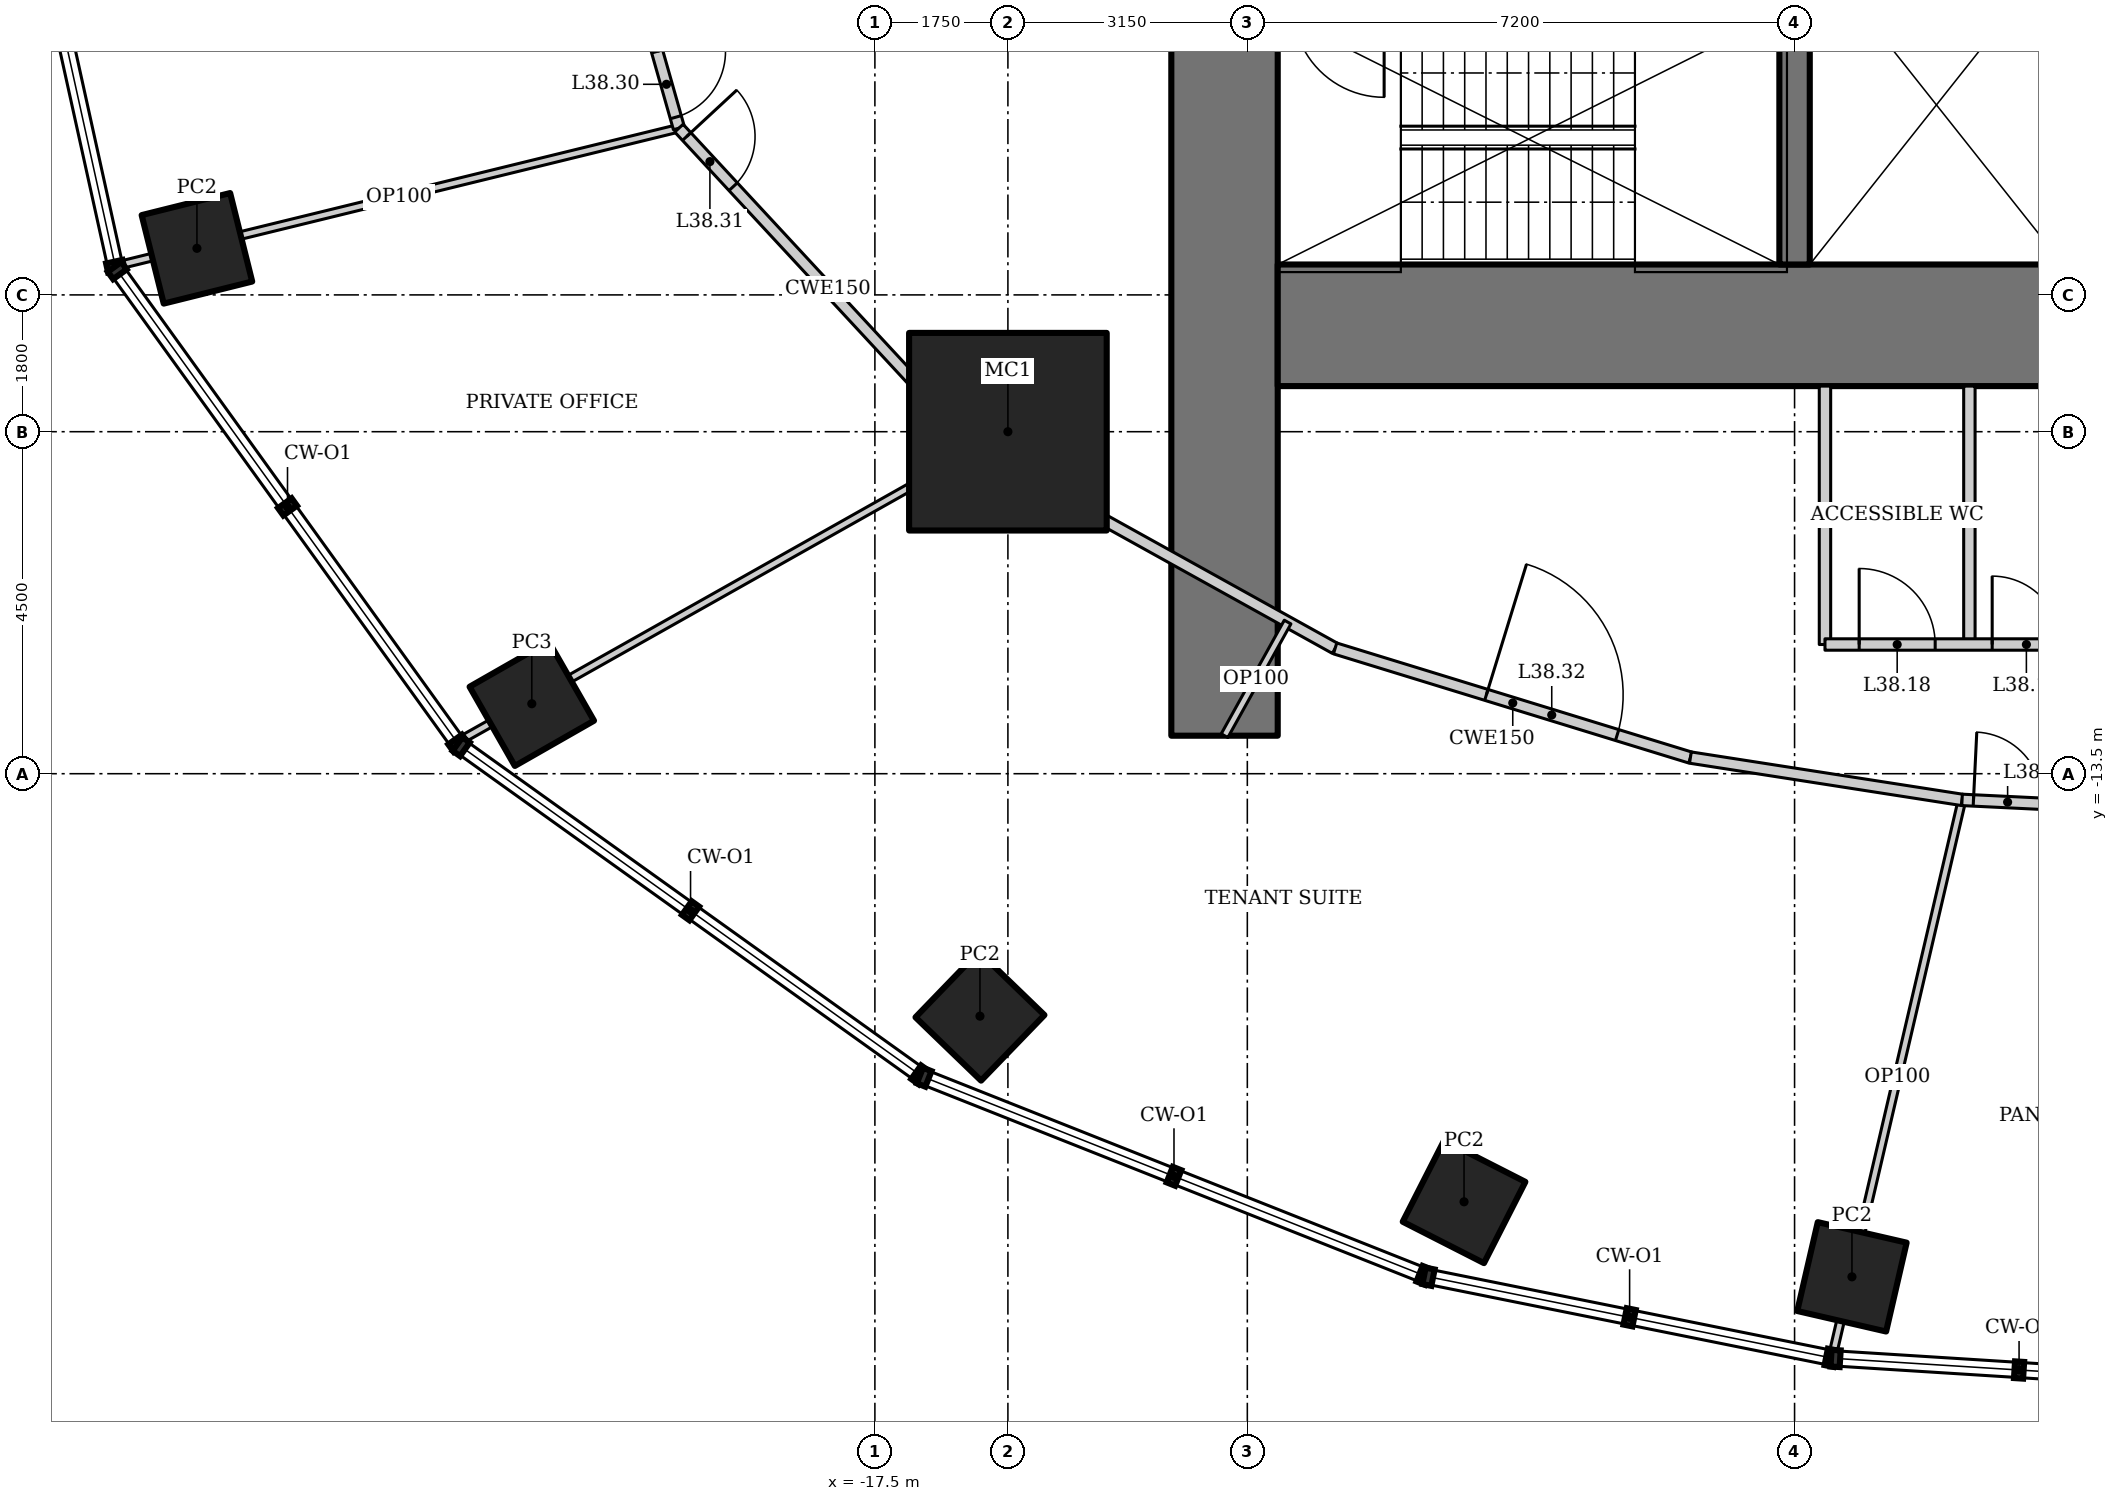
"""IFC4 building model, lengths in metres.
Left out: names, types, materials, properties, quantities, classifications, styles, units other than length and angle.
Written with IfcOpenShell. Run it as: python <this file> out.ifc"""

import sys

from ifc_helpers import new_model, si_unit, direction, frame, frame_2d, origin, origin_2d, place, context, subcontext, project, spatial, rectangle, hollow_rectangle, extrude, element, fill, save


model = new_model("IFC4")
c1 = context("Model", 3, precision=1e-05, world=origin(), true_north=direction((0.0, 1.0)))
c2 = subcontext(c1, "Body", "Model", "MODEL_VIEW")
j1 = project(units=[si_unit("LENGTHUNIT", "METRE"), si_unit("PLANEANGLEUNIT", "RADIAN")], contexts=[c1])
p1 = place(None, origin())
s1 = spatial("IfcSite", under=j1, at=p1, CompositionType="ELEMENT")
p2 = place(p1, origin())
s2 = spatial("IfcBuilding", under=s1, at=p2, CompositionType="ELEMENT")
p3 = place(p2, frame((0.0, 0.0, 163.6)))
s3 = spatial("IfcBuildingStorey", under=s2, at=p3, CompositionType="ELEMENT", Elevation=163.6)
p4 = place(p3, frame((-15.75, -9.0, 0.0), z_axis=(0.0, 0.0, 1.0), x_axis=(1.0, 0.0, 0.0)))
e1 = element("IfcColumn", 1, at=p4, inside=s3, PredefinedType="COLUMN", context=c2, shape_type="SweptSolid", body=[
    extrude(hollow_rectangle(XDim=2.6, YDim=2.6, WallThickness=0.13, at=origin_2d()), origin(), (0.0, 0.0, 1.0), 4.2),
])
p5 = place(p3, frame((-26.42, -6.587, 0.0), z_axis=(0.0, 0.0, 1.0), x_axis=(0.970295726276, 0.2419218956, 0.0)))
e2 = element("IfcColumn", 2, at=p5, inside=s3, PredefinedType="COLUMN", context=c2, shape_type="SweptSolid", body=[
    extrude(hollow_rectangle(XDim=1.2, YDim=1.2, WallThickness=0.1, at=origin_2d()), origin(), (0.0, 0.0, 1.0), 4.2),
])
p6 = place(p3, frame((-22.014, -12.579, 0.0), z_axis=(0.0, 0.0, 1.0), x_axis=(0.86824298017, 0.496139221777, 0.0)))
e3 = element("IfcColumn", 3, at=p6, inside=s3, PredefinedType="COLUMN", context=c2, shape_type="SweptSolid", body=[
    extrude(hollow_rectangle(XDim=1.2, YDim=1.2, WallThickness=0.12, at=origin_2d()), origin(), (0.0, 0.0, 1.0), 4.2),
])
for number, where, z_axis, x_axis in (
    (4, (-16.118, -16.69, 0.0), (0.0, 0.0, 1.0), (0.695, 0.719, 0.0)),
    (5, (-9.749, -19.133, 0.0), (0.0, 0.0, 1.0), (0.454, 0.891, 0.0)),
    (6, (-4.645, -20.12, 0.0), (0.0, 0.0, 1.0), (0.225, 0.974, 0.0)),
):
    element("IfcColumn", number, at=place(p3, frame(where, z_axis=z_axis, x_axis=x_axis)), inside=s3, PredefinedType="COLUMN", context=c2, shape_type="SweptSolid", body=[
        extrude(hollow_rectangle(XDim=1.2, YDim=1.2, WallThickness=0.1, at=origin_2d()), origin(), (0.0, 0.0, 1.0), 4.2),
    ])
p7 = place(p3, frame((-12.9, 13.0, 0.0), z_axis=(0.0, 0.0, 1.0), x_axis=(0.0, -1.0, 0.0)))
e7 = element("IfcWall", 7, at=p7, inside=s3, PredefinedType="SHEAR", context=c2, shape_type="SweptSolid", body=[
    extrude(rectangle(XDim=26.0, YDim=1.4, at=frame_2d((13.0, 0.0))), origin(), (0.0, 0.0, 1.0), 4.2),
])
p8 = place(p7, frame((12.1, 0.0, 0.0)))
e8 = element("IfcOpeningElement", 8, at=p8, cuts=e7, PredefinedType="OPENING", context=c2, shape_type="SweptSolid", body=[
    extrude(rectangle(XDim=1.8, YDim=2.1, at=frame_2d((0.9, 1.05))), frame((0.0, 0.71, 0.0), z_axis=(0.0, -1.0, 0.0), x_axis=(1.0, 0.0, 0.0)), (0.0, 0.0, 1.0), 1.42),
])
p9 = place(p3, frame((-12.2, -7.6, 0.0), z_axis=(0.0, 0.0, 1.0), x_axis=(1.0, 0.0, 0.0)))
e9 = element("IfcWall", 9, at=p9, inside=s3, PredefinedType="SHEAR", context=c2, shape_type="SweptSolid", body=[
    extrude(rectangle(XDim=24.4, YDim=1.6, at=frame_2d((12.2, 0.0))), origin(), (0.0, 0.0, 1.0), 4.2),
])
p10 = place(p3, frame((-5.4, 6.8, 0.0), z_axis=(0.0, 0.0, 1.0), x_axis=(0.0, -1.0, 0.0)))
e10 = element("IfcWall", 10, at=p10, inside=s3, PredefinedType="SHEAR", context=c2, shape_type="SweptSolid", body=[
    extrude(rectangle(XDim=13.6, YDim=0.4, at=frame_2d((6.8, 0.0))), origin(), (0.0, 0.0, 1.0), 4.2),
])
p11 = place(p10, frame((5.9, 0.0, 0.0)))
e11 = element("IfcOpeningElement", 11, at=p11, cuts=e10, PredefinedType="OPENING", context=c2, shape_type="SweptSolid", body=[
    extrude(rectangle(XDim=1.8, YDim=2.1, at=frame_2d((0.9, 1.05))), frame((0.0, 0.21, 0.0), z_axis=(0.0, -1.0, 0.0), x_axis=(1.0, 0.0, 0.0)), (0.0, 0.0, 1.0), 0.42),
])
p12 = place(p3, frame((-27.441, -6.809, 0.0), z_axis=(0.0, 0.0, 1.0), x_axis=(0.971305815804, 0.237834001323, 0.0)))
e12 = element("IfcWall", 12, at=p12, inside=s3, PredefinedType="PARTITIONING", context=c2, shape_type="SweptSolid", body=[
    extrude(rectangle(XDim=7.58, YDim=0.1, at=frame_2d((3.79, 0.0))), origin(), (0.0, 0.0, 1.0), 3.113),
])
p13 = place(p3, frame((-22.949, -13.059, 0.0), z_axis=(0.0, 0.0, 1.0), x_axis=(0.871274989434, 0.490795163777, 0.0)))
e13 = element("IfcWall", 13, at=p13, inside=s3, PredefinedType="PARTITIONING", context=c2, shape_type="SweptSolid", body=[
    extrude(rectangle(XDim=7.792, YDim=0.1, at=frame_2d((3.896, 0.0))), origin(), (0.0, 0.0, 1.0), 3.45),
])
p14 = place(p3, frame((-4.897, -21.135, 0.0), z_axis=(0.0, 0.0, 1.0), x_axis=(0.227181159974, 0.973852514785, 0.0)))
e14 = element("IfcWall", 14, at=p14, inside=s3, PredefinedType="PARTITIONING", context=c2, shape_type="SweptSolid", body=[
    extrude(rectangle(XDim=7.486, YDim=0.1, at=frame_2d((3.743, 0.0))), origin(), (0.0, 0.0, 1.0), 3.293),
])
p15 = place(p3, frame((-21.5, 0.0, 0.0), z_axis=(0.0, 0.0, 1.0), x_axis=(0.273177936169, -0.961963520717, 0.0)))
e15 = element("IfcWall", 15, at=p15, inside=s3, PredefinedType="PARTITIONING", context=c2, shape_type="SweptSolid", body=[
    extrude(rectangle(XDim=5.204, YDim=0.15, at=frame_2d((2.602, 0.0))), origin(), (0.0, 0.0, 1.0), 4.05),
])
p16 = place(p15, frame((4.154, 0.0, 0.0)))
e16 = element("IfcOpeningElement", 16, at=p16, cuts=e15, PredefinedType="OPENING", context=c2, shape_type="SweptSolid", body=[
    extrude(rectangle(XDim=0.9, YDim=2.1, at=frame_2d((0.45, 1.05))), frame((0.0, 0.085, 0.0), z_axis=(0.0, -1.0, 0.0), x_axis=(1.0, 0.0, 0.0)), (0.0, 0.0, 1.0), 0.17),
])
p17 = place(p3, frame((-20.078, -5.006, 0.0), z_axis=(0.0, 0.0, 1.0), x_axis=(0.679724658223, -0.733467374191, 0.0)))
e17 = element("IfcWall", 17, at=p17, inside=s3, PredefinedType="PARTITIONING", context=c2, shape_type="SweptSolid", body=[
    extrude(rectangle(XDim=5.765, YDim=0.15, at=frame_2d((2.882, 0.0))), origin(), (0.0, 0.0, 1.0), 4.05),
])
p18 = place(p17, frame((0.15, 0.0, 0.0)))
e18 = element("IfcOpeningElement", 18, at=p18, cuts=e17, PredefinedType="OPENING", context=c2, shape_type="SweptSolid", body=[
    extrude(rectangle(XDim=0.9, YDim=2.1, at=frame_2d((0.45, 1.05))), frame((0.0, 0.085, 0.0), z_axis=(0.0, -1.0, 0.0), x_axis=(1.0, 0.0, 0.0)), (0.0, 0.0, 1.0), 0.17),
])
p19 = place(p3, frame((-16.16, -9.234, 0.0), z_axis=(0.0, 0.0, 1.0), x_axis=(0.87433873028, -0.485316169865, 0.0)))
e19 = element("IfcWall", 19, at=p19, inside=s3, PredefinedType="PARTITIONING", context=c2, shape_type="SweptSolid", body=[
    extrude(rectangle(XDim=5.393, YDim=0.15, at=frame_2d((2.696, 0.0))), origin(), (0.0, 0.0, 1.0), 4.05),
])
p20 = place(p3, frame((-11.445, -11.852, 0.0), z_axis=(0.0, 0.0, 1.0), x_axis=(0.955892284323, -0.293717450573, 0.0)))
e20 = element("IfcWall", 20, at=p20, inside=s3, PredefinedType="PARTITIONING", context=c2, shape_type="SweptSolid", body=[
    extrude(rectangle(XDim=4.89, YDim=0.15, at=frame_2d((2.445, 0.0))), origin(), (0.0, 0.0, 1.0), 4.05),
])
p21 = place(p20, frame((2.082, 0.0, 0.0)))
e21 = element("IfcOpeningElement", 21, at=p21, cuts=e20, PredefinedType="OPENING", context=c2, shape_type="SweptSolid", body=[
    extrude(rectangle(XDim=1.8, YDim=2.1, at=frame_2d((0.9, 1.05))), frame((0.0, 0.085, 0.0), z_axis=(0.0, -1.0, 0.0), x_axis=(1.0, 0.0, 0.0)), (0.0, 0.0, 1.0), 0.17),
])
p22 = place(p3, frame((-6.771, -13.288, 0.0), z_axis=(0.0, 0.0, 1.0), x_axis=(0.98808911792, -0.153882731479, 0.0)))
e22 = element("IfcWall", 22, at=p22, inside=s3, PredefinedType="PARTITIONING", context=c2, shape_type="SweptSolid", body=[
    extrude(rectangle(XDim=3.617, YDim=0.15, at=frame_2d((1.809, 0.0))), origin(), (0.0, 0.0, 1.0), 4.05),
])
for number, where, z_axis, x_axis in (
    (23, (-5.0, -8.4, 0.0), (0.0, 0.0, 1.0), (0.0, -1.0, 0.0)),
    (24, (-3.1, -8.4, 0.0), (0.0, 0.0, 1.0), (0.0, -1.0, 0.0)),
):
    element("IfcWall", number, at=place(p3, frame(where, z_axis=z_axis, x_axis=x_axis)), inside=s3, PredefinedType="SOLIDWALL", context=c2, shape_type="SweptSolid", body=[
        extrude(rectangle(XDim=3.4, YDim=0.15, at=frame_2d((1.7, 0.0))), origin(), (0.0, 0.0, 1.0), 4.05),
    ])
p23 = place(p3, frame((-12.9, -13.0, 0.0), z_axis=(0.0, 0.0, 1.0), x_axis=(0.485339901234, 0.87432555737, 0.0)))
e25 = element("IfcWall", 25, at=p23, inside=s3, PredefinedType="PARTITIONING", context=c2, shape_type="SweptSolid", body=[
    extrude(rectangle(XDim=1.71, YDim=0.1, at=frame_2d((0.855, 0.0))), origin(), (0.0, 0.0, 1.0), 4.05),
])
p24 = place(p3, frame((-3.196, -13.844, 0.0), z_axis=(0.0, 0.0, 1.0), x_axis=(0.998823043489, -0.048502863789, 0.0)))
e26 = element("IfcWall", 26, at=p24, inside=s3, PredefinedType="PARTITIONING", context=c2, shape_type="SweptSolid", body=[
    extrude(rectangle(XDim=1.163, YDim=0.15, at=frame_2d((0.582, 0.0))), origin(), (0.0, 0.0, 1.0), 4.05),
])
p25 = place(p24, frame((0.15, 0.0, 0.0)))
e27 = element("IfcOpeningElement", 27, at=p25, cuts=e26, PredefinedType="OPENING", context=c2, shape_type="SweptSolid", body=[
    extrude(rectangle(XDim=0.9, YDim=2.1, at=frame_2d((0.45, 1.05))), frame((0.0, 0.085, 0.0), z_axis=(0.0, -1.0, 0.0), x_axis=(1.0, 0.0, 0.0)), (0.0, 0.0, 1.0), 0.17),
])
p26 = place(p3, frame((-5.0, -11.8, 0.0), z_axis=(0.0, 0.0, 1.0), x_axis=(1.0, 0.0, 0.0)))
e28 = element("IfcWall", 28, at=p26, inside=s3, PredefinedType="SOLIDWALL", context=c2, shape_type="SweptSolid", body=[
    extrude(rectangle(XDim=3.236, YDim=0.15, at=frame_2d((1.618, 0.0))), origin(), (0.0, 0.0, 1.0), 4.05),
])
p27 = place(p26, frame((0.45, 0.0, 0.0)))
e29 = element("IfcOpeningElement", 29, at=p27, cuts=e28, PredefinedType="OPENING", context=c2, shape_type="SweptSolid", body=[
    extrude(rectangle(XDim=1.0, YDim=2.1, at=frame_2d((0.5, 1.05))), frame((0.0, 0.085, 0.0), z_axis=(0.0, -1.0, 0.0), x_axis=(1.0, 0.0, 0.0)), (0.0, 0.0, 1.0), 0.17),
])
p28 = place(p26, frame((2.2, 0.0, 0.0)))
e30 = element("IfcOpeningElement", 30, at=p28, cuts=e28, PredefinedType="OPENING", context=c2, shape_type="SweptSolid", body=[
    extrude(rectangle(XDim=0.9, YDim=2.1, at=frame_2d((0.45, 1.05))), frame((0.0, 0.085, 0.0), z_axis=(0.0, -1.0, 0.0), x_axis=(1.0, 0.0, 0.0)), (0.0, 0.0, 1.0), 0.17),
])
p29 = place(p27, origin())
e31 = element("IfcDoor", 31, at=p29, inside=s3, OperationType="SINGLE_SWING_LEFT", PredefinedType="DOOR", context=c2, shape_type="SweptSolid", body=[
    extrude(rectangle(XDim=1.0, YDim=2.1, at=frame_2d((0.5, 1.05))), frame((0.0, 0.025, 0.0), z_axis=(0.0, -1.0, 0.0), x_axis=(1.0, 0.0, 0.0)), (0.0, 0.0, 1.0), 0.05),
])
fill(e29, e31)
p30 = place(p28, origin())
e32 = element("IfcDoor", 32, at=p30, inside=s3, OperationType="SINGLE_SWING_LEFT", PredefinedType="DOOR", context=c2, shape_type="SweptSolid", body=[
    extrude(rectangle(XDim=0.9, YDim=2.1, at=frame_2d((0.45, 1.05))), frame((0.0, 0.025, 0.0), z_axis=(0.0, -1.0, 0.0), x_axis=(1.0, 0.0, 0.0)), (0.0, 0.0, 1.0), 0.05),
])
fill(e30, e32)
p31 = place(p16, origin())
e33 = element("IfcDoor", 33, at=p31, inside=s3, OperationType="SINGLE_SWING_LEFT", PredefinedType="DOOR", context=c2, shape_type="SweptSolid", body=[
    extrude(rectangle(XDim=0.9, YDim=2.1, at=frame_2d((0.45, 1.05))), frame((0.0, 0.025, 0.0), z_axis=(0.0, -1.0, 0.0), x_axis=(1.0, 0.0, 0.0)), (0.0, 0.0, 1.0), 0.05),
])
fill(e16, e33)
p32 = place(p18, origin())
e34 = element("IfcDoor", 34, at=p32, inside=s3, OperationType="SINGLE_SWING_LEFT", PredefinedType="DOOR", context=c2, shape_type="SweptSolid", body=[
    extrude(rectangle(XDim=0.9, YDim=2.1, at=frame_2d((0.45, 1.05))), frame((0.0, 0.025, 0.0), z_axis=(0.0, -1.0, 0.0), x_axis=(1.0, 0.0, 0.0)), (0.0, 0.0, 1.0), 0.05),
])
fill(e18, e34)
p33 = place(p21, origin())
e35 = element("IfcDoor", 35, at=p33, inside=s3, OperationType="DOUBLE_DOOR_DOUBLE_SWING", PredefinedType="DOOR", context=c2, shape_type="SweptSolid", body=[
    extrude(rectangle(XDim=1.8, YDim=2.1, at=frame_2d((0.9, 1.05))), frame((0.0, 0.025, 0.0), z_axis=(0.0, -1.0, 0.0), x_axis=(1.0, 0.0, 0.0)), (0.0, 0.0, 1.0), 0.05),
])
fill(e21, e35)
p34 = place(p25, origin())
e36 = element("IfcDoor", 36, at=p34, inside=s3, OperationType="SINGLE_SWING_LEFT", PredefinedType="DOOR", context=c2, shape_type="SweptSolid", body=[
    extrude(rectangle(XDim=0.9, YDim=2.1, at=frame_2d((0.45, 1.05))), frame((0.0, 0.025, 0.0), z_axis=(0.0, -1.0, 0.0), x_axis=(1.0, 0.0, 0.0)), (0.0, 0.0, 1.0), 0.05),
])
fill(e27, e36)
save(model, sys.argv[1])
